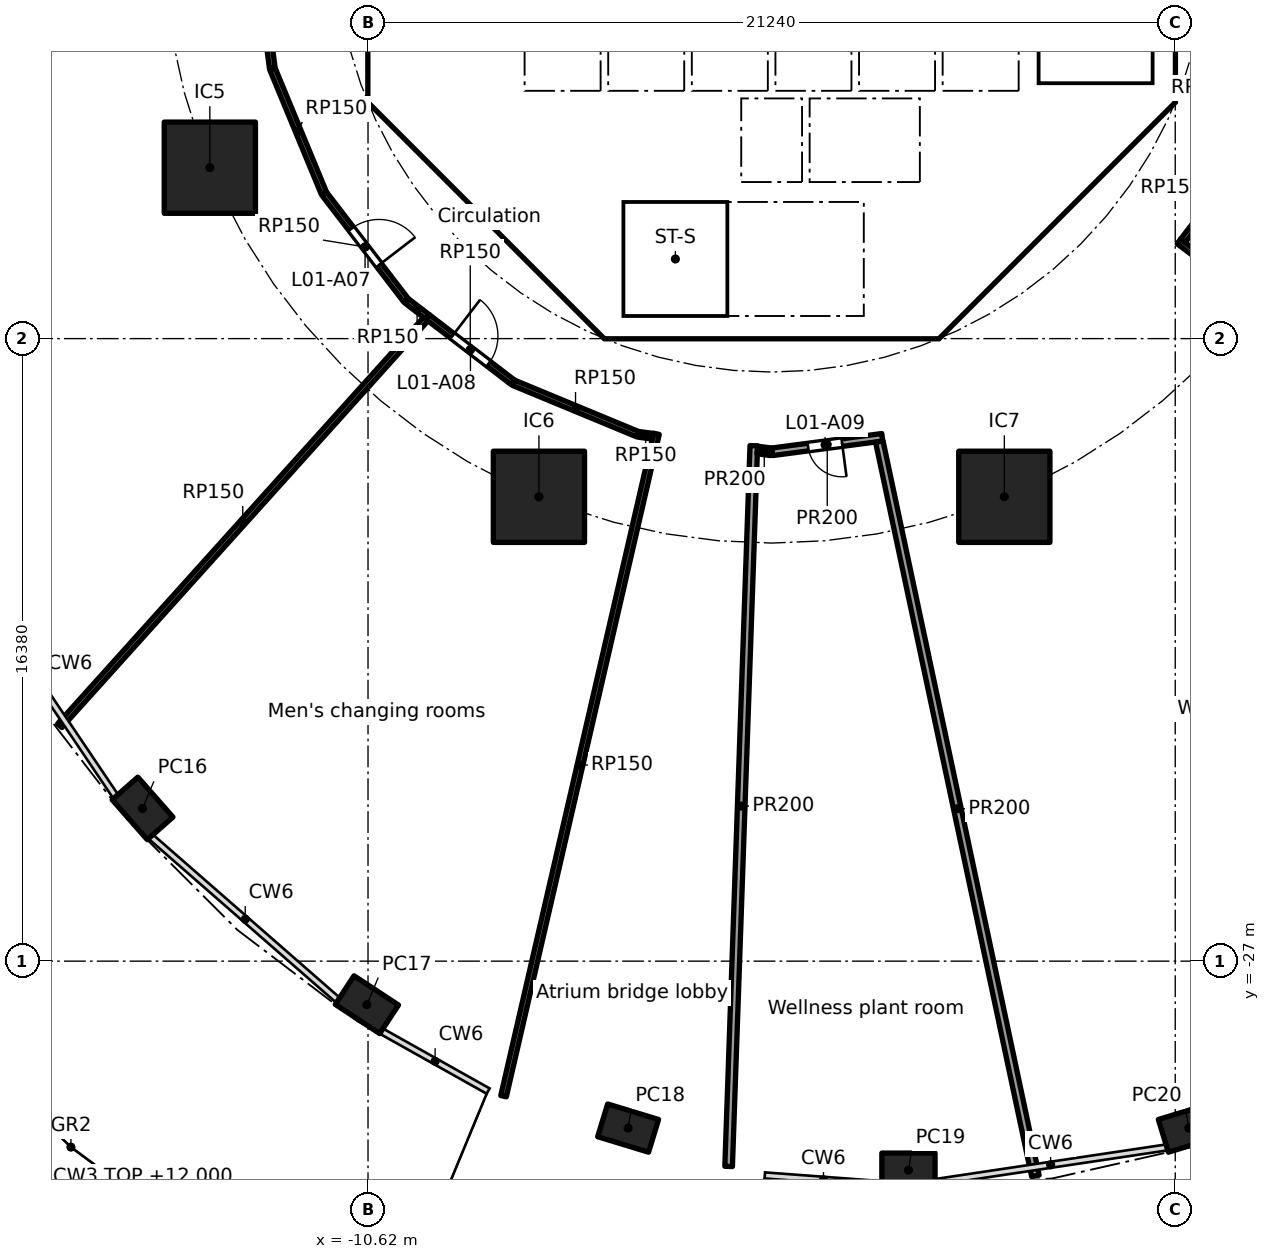
"""IFC4 building model, lengths in metres.
Left out: names, types, materials, properties, quantities, classifications, styles, units other than length and angle.
Written with IfcOpenShell. Run it as: python <this file> out.ifc"""

import sys

from ifc_helpers import new_model, si_unit, direction, frame, frame_2d, origin, origin_2d, place, context, subcontext, project, spatial, polyline, rectangle, hollow_rectangle, outline, extrude, element, fill, save


model = new_model("IFC4")
c1 = context("Model", 3, precision=1e-05, world=origin(), true_north=direction((0.0, 1.0)))
c2 = subcontext(c1, "Body", "Model", "MODEL_VIEW")
j1 = project(units=[si_unit("LENGTHUNIT", "METRE"), si_unit("PLANEANGLEUNIT", "RADIAN")], contexts=[c1])
p1 = place(None, origin())
s1 = spatial("IfcSite", under=j1, at=p1, CompositionType="ELEMENT")
p2 = place(p1, origin())
s2 = spatial("IfcBuilding", under=s1, at=p2, CompositionType="ELEMENT")
p3 = place(p2, frame((0.0, 0.0, 7.0)))
s3 = spatial("IfcBuildingStorey", under=s2, at=p3, CompositionType="ELEMENT", Elevation=7.0)
for number, where, z_axis, x_axis in (
    (1, (-16.552, -22.981, 0.0), (0.0, 0.0, 1.0), (0.66, -0.751, 0.0)),
    (2, (-10.65, -28.146, 0.0), (0.0, 0.0, 1.0), (0.836, -0.549, 0.0)),
    (3, (-3.776, -31.393, 0.0), (0.0, 0.0, 1.0), (0.957, -0.292, 0.0)),
    (4, (3.6, -32.5, 0.0), (0.0, 0.0, 1.0), (1.0, 0.0, 0.0)),
    (5, (10.976, -31.393, 0.0), (0.0, 0.0, 1.0), (0.957, 0.292, 0.0)),
):
    element("IfcColumn", number, at=place(p3, frame(where, z_axis=z_axis, x_axis=x_axis)), inside=s3, PredefinedType="COLUMN", context=c2, shape_type="SweptSolid", body=[
        extrude(hollow_rectangle(XDim=1.4, YDim=0.9, WallThickness=0.05, at=origin_2d()), origin(), (0.0, 0.0, 1.0), 5.0),
    ])
for number, where, z_axis, x_axis in (
    (6, (-14.782, -6.123, 0.0), (0.0, 0.0, 1.0), (1.0, 0.0, 0.0)),
    (7, (-6.123, -14.782, 0.0), (0.0, 0.0, 1.0), (1.0, 0.0, 0.0)),
    (8, (6.123, -14.782, 0.0), (0.0, 0.0, 1.0), (1.0, 0.0, 0.0)),
):
    element("IfcColumn", number, at=place(p3, frame(where, z_axis=z_axis, x_axis=x_axis)), inside=s3, PredefinedType="COLUMN", context=c2, shape_type="SweptSolid", body=[
        extrude(rectangle(XDim=2.4, YDim=2.4, at=origin_2d()), origin(), (0.0, 0.0, 1.0), 5.0),
    ])
p4 = place(p3, frame((-10.325, 3.801, 0.0), z_axis=(0.0, 0.0, 1.0), x_axis=(0.0, -1.0, 0.0)))
e9 = element("IfcWall", 9, at=p4, inside=s3, PredefinedType="SHEAR", context=c2, shape_type="SweptSolid", body=[
    extrude(rectangle(XDim=7.602, YDim=0.6, at=frame_2d((3.801, 0.0))), origin(), (0.0, 0.0, 1.0), 4.7),
])
p5 = place(p4, frame((0.651, 0.0, 0.0)))
e10 = element("IfcOpeningElement", 10, at=p5, cuts=e9, PredefinedType="OPENING", context=c2, shape_type="SweptSolid", body=[
    extrude(rectangle(XDim=1.5, YDim=2.1, at=frame_2d((0.75, 1.05))), frame((0.0, 0.31, 0.0), z_axis=(0.0, -1.0, 0.0), x_axis=(1.0, 0.0, 0.0)), (0.0, 0.0, 1.0), 0.62),
])
p6 = place(p4, frame((5.451, 0.0, 0.0)))
e11 = element("IfcOpeningElement", 11, at=p6, cuts=e9, PredefinedType="OPENING", context=c2, shape_type="SweptSolid", body=[
    extrude(rectangle(XDim=1.5, YDim=2.1, at=frame_2d((0.75, 1.05))), frame((0.0, 0.31, 0.0), z_axis=(0.0, -1.0, 0.0), x_axis=(1.0, 0.0, 0.0)), (0.0, 0.0, 1.0), 0.62),
])
p7 = place(p3, frame((-9.988, -4.613, 0.0), z_axis=(0.0, 0.0, 1.0), x_axis=(0.707106781187, -0.707106781187, 0.0)))
e12 = element("IfcWall", 12, at=p7, inside=s3, PredefinedType="SHEAR", context=c2, shape_type="SweptSolid", body=[
    extrude(rectangle(XDim=7.602, YDim=0.6, at=frame_2d((3.801, 0.0))), origin(), (0.0, 0.0, 1.0), 4.7),
])
p8 = place(p7, frame((6.151, 0.0, 0.0)))
e13 = element("IfcOpeningElement", 13, at=p8, cuts=e12, PredefinedType="OPENING", context=c2, shape_type="SweptSolid", body=[
    extrude(rectangle(XDim=1.1, YDim=2.1, at=frame_2d((0.55, 1.05))), frame((0.0, 0.31, 0.0), z_axis=(0.0, -1.0, 0.0), x_axis=(1.0, 0.0, 0.0)), (0.0, 0.0, 1.0), 0.62),
])
p9 = place(p3, frame((4.613, -9.988, 0.0), z_axis=(0.0, 0.0, 1.0), x_axis=(0.707106781187, 0.707106781187, 0.0)))
e14 = element("IfcWall", 14, at=p9, inside=s3, PredefinedType="SHEAR", context=c2, shape_type="SweptSolid", body=[
    extrude(rectangle(XDim=7.602, YDim=0.6, at=frame_2d((3.801, 0.0))), origin(), (0.0, 0.0, 1.0), 4.7),
])
p10 = place(p9, frame((3.201, 0.0, 0.0)))
e15 = element("IfcOpeningElement", 15, at=p10, cuts=e14, PredefinedType="OPENING", context=c2, shape_type="SweptSolid", body=[
    extrude(rectangle(XDim=1.2, YDim=2.1, at=frame_2d((0.6, 1.05))), frame((0.0, 0.31, 0.0), z_axis=(0.0, -1.0, 0.0), x_axis=(1.0, 0.0, 0.0)), (0.0, 0.0, 1.0), 0.62),
])
p11 = place(p3, frame((4.0, -10.025, 0.0), z_axis=(0.0, 0.0, 1.0), x_axis=(0.0, 1.0, 0.0)))
e16 = element("IfcWall", 16, at=p11, inside=s3, PredefinedType="SOLIDWALL", context=c2, shape_type="SweptSolid", body=[
    extrude(rectangle(XDim=3.0, YDim=0.2, at=frame_2d((1.5, 0.0))), origin(), (0.0, 0.0, 1.0), 4.7),
])
p12 = place(p11, frame((0.975, 0.0, 0.0)))
e17 = element("IfcOpeningElement", 17, at=p12, cuts=e16, PredefinedType="OPENING", context=c2, shape_type="SweptSolid", body=[
    extrude(rectangle(XDim=1.1, YDim=2.1, at=frame_2d((0.55, 1.05))), frame((0.0, 0.11, 0.0), z_axis=(0.0, -1.0, 0.0), x_axis=(1.0, 0.0, 0.0)), (0.0, 0.0, 1.0), 0.22),
])
p13 = place(p3, frame((-5.8, -8.227, 0.0), z_axis=(0.0, 0.0, 1.0), x_axis=(0.0, 1.0, 0.0)))
e18 = element("IfcWall", 18, at=p13, inside=s3, PredefinedType="PARTITIONING", context=c2, shape_type="SweptSolid", body=[
    extrude(rectangle(XDim=3.927, YDim=0.15, at=frame_2d((1.963, 0.0))), origin(), (0.0, 0.0, 1.0), 4.7),
])
p14 = place(p13, frame((1.476, 0.0, 0.0)))
e19 = element("IfcOpeningElement", 19, at=p14, cuts=e18, PredefinedType="OPENING", context=c2, shape_type="SweptSolid", body=[
    extrude(rectangle(XDim=0.9, YDim=2.1, at=frame_2d((0.45, 1.05))), frame((0.0, 0.085, 0.0), z_axis=(0.0, -1.0, 0.0), x_axis=(1.0, 0.0, 0.0)), (0.0, 0.0, 1.0), 0.17),
])
p15 = place(p3, frame((4.0, -6.5, 0.0), z_axis=(0.0, 0.0, 1.0), x_axis=(0.0, 1.0, 0.0)))
e20 = element("IfcWall", 20, at=p15, inside=s3, PredefinedType="SOLIDWALL", context=c2, shape_type="SweptSolid", body=[
    extrude(rectangle(XDim=2.2, YDim=0.2, at=frame_2d((1.1, 0.0))), origin(), (0.0, 0.0, 1.0), 4.7),
])
p16 = place(p15, frame((0.55, 0.0, 0.0)))
e21 = element("IfcOpeningElement", 21, at=p16, cuts=e20, PredefinedType="OPENING", context=c2, shape_type="SweptSolid", body=[
    extrude(rectangle(XDim=1.1, YDim=2.1, at=frame_2d((0.55, 1.05))), frame((0.0, 0.11, 0.0), z_axis=(0.0, -1.0, 0.0), x_axis=(1.0, 0.0, 0.0)), (0.0, 0.0, 1.0), 0.22),
])
p17 = place(p3, frame((-4.0, -6.5, 0.0), z_axis=(0.0, 0.0, 1.0), x_axis=(0.0, 1.0, 0.0)))
e22 = element("IfcWall", 22, at=p17, inside=s3, PredefinedType="SOLIDWALL", context=c2, shape_type="SweptSolid", body=[
    extrude(rectangle(XDim=2.2, YDim=0.2, at=frame_2d((1.1, 0.0))), origin(), (0.0, 0.0, 1.0), 4.7),
])
p18 = place(p17, frame((0.65, 0.0, 0.0)))
e23 = element("IfcOpeningElement", 23, at=p18, cuts=e22, PredefinedType="OPENING", context=c2, shape_type="SweptSolid", body=[
    extrude(rectangle(XDim=0.9, YDim=2.1, at=frame_2d((0.45, 1.05))), frame((0.0, 0.11, 0.0), z_axis=(0.0, -1.0, 0.0), x_axis=(1.0, 0.0, 0.0)), (0.0, 0.0, 1.0), 0.22),
])
p19 = place(p3, origin())
e24 = element("IfcWall", 24, at=p19, inside=s3, PredefinedType="SHEAR", context=c2, shape_type="SweptSolid", body=[
    extrude(outline(polyline([(-10.625, -3.801), (-10.025, -3.801), (-10.025, -4.152), (-9.776, -4.401), (-10.2, -4.825), (-10.625, -4.401), (-10.625, -3.801)])), origin(), (0.0, 0.0, 1.0), 4.7),
])
p20 = place(p3, origin())
e25 = element("IfcWall", 25, at=p20, inside=s3, PredefinedType="SHEAR", context=c2, shape_type="SweptSolid", body=[
    extrude(outline(polyline([(-4.152, -10.025), (4.152, -10.025), (4.401, -9.776), (4.825, -10.2), (4.401, -10.625), (-4.401, -10.625), (-4.825, -10.2), (-4.401, -9.776), (-4.152, -10.025)])), origin(), (0.0, 0.0, 1.0), 4.7),
])
p21 = place(p3, origin())
e26 = element("IfcWall", 26, at=p21, inside=s3, PredefinedType="SHEAR", context=c2, shape_type="SweptSolid", body=[
    extrude(outline(polyline([(9.776, -4.401), (10.025, -4.152), (10.025, -3.801), (10.025, 4.152), (9.776, 4.401), (10.2, 4.825), (10.625, 4.401), (10.625, -4.401), (10.2, -4.825), (9.776, -4.401)])), origin(), (0.0, 0.0, 1.0), 4.7),
])
for number, where, z_axis, x_axis in (
    (27, (-0.9, -6.5, 0.0), (0.0, 0.0, 1.0), (0.0, 1.0, 0.0)),
    (28, (0.9, -6.5, 0.0), (0.0, 0.0, 1.0), (0.0, 1.0, 0.0)),
):
    element("IfcWall", number, at=place(p3, frame(where, z_axis=z_axis, x_axis=x_axis)), inside=s3, PredefinedType="SOLIDWALL", context=c2, shape_type="SweptSolid", body=[
        extrude(rectangle(XDim=2.2, YDim=0.2, at=frame_2d((1.1, 0.0))), origin(), (0.0, 0.0, 1.0), 4.7),
    ])
p22 = place(p3, origin())
e29 = element("IfcWall", 29, at=p22, inside=s3, PredefinedType="SOLIDWALL", context=c2, shape_type="SweptSolid", body=[
    extrude(outline(polyline([(-6.7, -2.1), (-6.5, -2.1), (-6.5, -4.1), (-4.5, -4.1), (-4.5, -2.1), (-4.3, -2.1), (-4.3, -4.1), (-2.3, -4.1), (-2.3, -2.1), (-2.1, -2.1), (-2.1, -4.1), (-0.1, -4.1), (-0.1, -2.1), (0.1, -2.1), (0.1, -4.1), (2.1, -4.1), (2.1, -2.1), (2.3, -2.1), (2.3, -4.1), (4.3, -4.1), (4.3, -2.1), (4.5, -2.1), (4.5, -4.1), (6.5, -4.1), (6.5, -2.1), (6.7, -2.1), (6.7, -4.3), (-6.7, -4.3), (-6.7, -2.1)])), origin(), (0.0, 0.0, 1.0), 4.7),
])
p23 = place(p3, frame((-10.025, -4.0, 0.0), z_axis=(0.0, 0.0, 1.0), x_axis=(1.0, 0.0, 0.0)))
e30 = element("IfcWall", 30, at=p23, inside=s3, PredefinedType="PARTITIONING", context=c2, shape_type="SweptSolid", body=[
    extrude(rectangle(XDim=3.325, YDim=0.2, at=frame_2d((1.662, 0.0))), origin(), (0.0, 0.0, 1.0), 4.7),
])
p24 = place(p3, origin())
e31 = element("IfcWall", 31, at=p24, inside=s3, PredefinedType="SOLIDWALL", context=c2, shape_type="SweptSolid", body=[
    extrude(outline(polyline([(-3.9, -10.025), (-4.1, -10.025), (-4.1, -7.025), (-3.9, -7.025), (-3.9, -10.025)])), origin(), (0.0, 0.0, 1.0), 4.7),
])
p25 = place(p3, origin())
e32 = element("IfcWall", 32, at=p25, inside=s3, PredefinedType="SOLIDWALL", context=c2, shape_type="SweptSolid", body=[
    extrude(outline(polyline([(4.1, -7.025), (-4.1, -7.025), (-4.1, -6.5), (4.1, -6.5), (4.1, -7.025)])), origin(), (0.0, 0.0, 1.0), 4.7),
])
p26 = place(p3, origin())
e33 = element("IfcWall", 33, at=p26, inside=s3, PredefinedType="SOLIDWALL", context=c2, shape_type="SweptSolid", body=[
    extrude(outline(polyline([(7.025, -3.9), (6.7, -3.9), (6.7, 3.9), (7.025, 3.9), (7.025, -3.9)])), origin(), (0.0, 0.0, 1.0), 4.7),
])
p27 = place(p3, origin())
e34 = element("IfcWall", 34, at=p27, inside=s3, PredefinedType="SOLIDWALL", context=c2, shape_type="SweptSolid", body=[
    extrude(outline(polyline([(10.025, -4.1), (6.7, -4.1), (6.7, -3.9), (10.025, -3.9), (10.025, -4.1)])), origin(), (0.0, 0.0, 1.0), 4.7),
])
p28 = place(p3, frame((-13.138, -3.508, 0.0), z_axis=(0.0, 0.0, 1.0), x_axis=(-0.130499283623, 0.991448403586, 0.0)))
e35 = element("IfcWall", 35, at=p28, inside=s3, PredefinedType="PARTITIONING", context=c2, shape_type="SweptSolid", body=[
    extrude(rectangle(XDim=3.527, YDim=0.15, at=frame_2d((1.763, 0.0))), origin(), (0.0, 0.0, 1.0), 4.7),
])
p29 = place(p3, frame((-11.782, -6.789, 0.0), z_axis=(0.0, 0.0, 1.0), x_axis=(-0.382677866108, 0.923881838111, 0.0)))
e36 = element("IfcWall", 36, at=p29, inside=s3, PredefinedType="PARTITIONING", context=c2, shape_type="SweptSolid", body=[
    extrude(rectangle(XDim=3.527, YDim=0.15, at=frame_2d((1.763, 0.0))), origin(), (0.0, 0.0, 1.0), 4.7),
])
p30 = place(p3, frame((-9.624, -9.607, 0.0), z_axis=(0.0, 0.0, 1.0), x_axis=(-0.608736710054, 0.793372307201, 0.0)))
e37 = element("IfcWall", 37, at=p30, inside=s3, PredefinedType="PARTITIONING", context=c2, shape_type="SweptSolid", body=[
    extrude(rectangle(XDim=3.527, YDim=0.15, at=frame_2d((1.763, 0.0))), origin(), (0.0, 0.0, 1.0), 4.7),
])
p31 = place(p30, frame((1.163, 0.0, 0.0)))
e38 = element("IfcOpeningElement", 38, at=p31, cuts=e37, PredefinedType="OPENING", context=c2, shape_type="SweptSolid", body=[
    extrude(rectangle(XDim=1.2, YDim=2.1, at=frame_2d((0.6, 1.05))), frame((0.0, 0.085, 0.0), z_axis=(0.0, -1.0, 0.0), x_axis=(1.0, 0.0, 0.0)), (0.0, 0.0, 1.0), 0.17),
])
p32 = place(p3, frame((-9.101, -10.107, 0.0), z_axis=(0.0, 0.0, 1.0), x_axis=(-0.669132472721, -0.743143144994, 0.0)))
e39 = element("IfcWall", 39, at=p32, inside=s3, PredefinedType="PARTITIONING", context=c2, shape_type="SweptSolid", body=[
    extrude(rectangle(XDim=14.392, YDim=0.15, at=frame_2d((7.196, 0.0))), origin(), (0.0, 0.0, 1.0), 4.7),
])
p33 = place(p3, frame((-9.05, -10.051, 0.0), z_axis=(0.0, 0.0, 1.0), x_axis=(-0.793399175387, 0.608701690893, 0.0)))
e40 = element("IfcWall", 40, at=p33, inside=s3, PredefinedType="PARTITIONING", context=c2, shape_type="SweptSolid", body=[
    extrude(rectangle(XDim=0.702, YDim=0.15, at=frame_2d((0.351, 0.0))), origin(), (0.0, 0.0, 1.0), 4.7),
])
p34 = place(p3, frame((-7.053, -30.552, 0.0), z_axis=(0.0, 0.0, 1.0), x_axis=(0.224943248141, 0.974371866956, 0.0)))
e41 = element("IfcWall", 41, at=p34, inside=s3, PredefinedType="PARTITIONING", context=c2, shape_type="SweptSolid", body=[
    extrude(rectangle(XDim=17.885, YDim=0.15, at=frame_2d((8.943, 0.0))), origin(), (0.0, 0.0, 1.0), 4.7),
])
p35 = place(p3, frame((-6.809, -11.771, 0.0), z_axis=(0.0, 0.0, 1.0), x_axis=(-0.793365630445, 0.608745411834, 0.0)))
e42 = element("IfcWall", 42, at=p35, inside=s3, PredefinedType="PARTITIONING", context=c2, shape_type="SweptSolid", body=[
    extrude(rectangle(XDim=2.825, YDim=0.15, at=frame_2d((1.412, 0.0))), origin(), (0.0, 0.0, 1.0), 4.7),
])
p36 = place(p35, frame((0.806, 0.0, 0.0)))
e43 = element("IfcOpeningElement", 43, at=p36, cuts=e42, PredefinedType="OPENING", context=c2, shape_type="SweptSolid", body=[
    extrude(rectangle(XDim=1.2, YDim=2.1, at=frame_2d((0.6, 1.05))), frame((0.0, 0.085, 0.0), z_axis=(0.0, -1.0, 0.0), x_axis=(1.0, 0.0, 0.0)), (0.0, 0.0, 1.0), 0.17),
])
p37 = place(p3, frame((-3.531, -13.132, 0.0), z_axis=(0.0, 0.0, 1.0), x_axis=(-0.923881838111, 0.382677866108, 0.0)))
e44 = element("IfcWall", 44, at=p37, inside=s3, PredefinedType="PARTITIONING", context=c2, shape_type="SweptSolid", body=[
    extrude(rectangle(XDim=3.527, YDim=0.15, at=frame_2d((1.763, 0.0))), origin(), (0.0, 0.0, 1.0), 4.7),
])
p38 = place(p3, frame((-3.122, -13.189, 0.0), z_axis=(0.0, 0.0, 1.0), x_axis=(-0.991467089631, 0.130357240609, 0.0)))
e45 = element("IfcWall", 45, at=p38, inside=s3, PredefinedType="PARTITIONING", context=c2, shape_type="SweptSolid", body=[
    extrude(rectangle(XDim=0.39, YDim=0.15, at=frame_2d((0.195, 0.0))), origin(), (0.0, 0.0, 1.0), 4.7),
])
p39 = place(p3, frame((10.714, -8.064, 0.0), z_axis=(0.0, 0.0, 1.0), x_axis=(0.798982081461, -0.601354831612, 0.0)))
e46 = element("IfcWall", 46, at=p39, inside=s3, PredefinedType="PARTITIONING", context=c2, shape_type="SweptSolid", body=[
    extrude(rectangle(XDim=19.824, YDim=0.15, at=frame_2d((9.912, 0.0))), origin(), (0.0, 0.0, 1.0), 4.7),
])
p40 = place(p3, frame((11.771, -6.809, 0.0), z_axis=(0.0, 0.0, 1.0), x_axis=(-0.608736478404, -0.79337248494, 0.0)))
e47 = element("IfcWall", 47, at=p40, inside=s3, PredefinedType="PARTITIONING", context=c2, shape_type="SweptSolid", body=[
    extrude(rectangle(XDim=1.563, YDim=0.15, at=frame_2d((0.781, 0.0))), origin(), (0.0, 0.0, 1.0), 4.7),
])
p41 = place(p3, frame((-0.469, -13.438, 0.0), z_axis=(0.0, 0.0, 1.0), x_axis=(-0.034906746489, -0.999390573825, 0.0)))
e48 = element("IfcWall", 48, at=p41, inside=s3, PredefinedType="PARTITIONING", context=c2, shape_type="SweptSolid", body=[
    extrude(rectangle(XDim=18.975, YDim=0.2, at=frame_2d((9.487, 0.0))), origin(), (0.0, 0.0, 1.0), 4.7),
])
p42 = place(p3, frame((-0.015, -13.598, 0.0), z_axis=(0.0, 0.0, 1.0), x_axis=(-0.991532387941, 0.129859630617, 0.0)))
e49 = element("IfcWall", 49, at=p42, inside=s3, PredefinedType="PARTITIONING", context=c2, shape_type="SweptSolid", body=[
    extrude(rectangle(XDim=0.361, YDim=0.2, at=frame_2d((0.181, 0.0))), origin(), (0.0, 0.0, 1.0), 4.7),
])
p43 = place(p3, frame((2.912, -13.217, 0.0), z_axis=(0.0, 0.0, 1.0), x_axis=(-0.991454864412, -0.130450189089, 0.0)))
e50 = element("IfcWall", 50, at=p43, inside=s3, PredefinedType="PARTITIONING", context=c2, shape_type="SweptSolid", body=[
    extrude(rectangle(XDim=2.921, YDim=0.2, at=frame_2d((1.461, 0.0))), origin(), (0.0, 0.0, 1.0), 4.7),
])
p44 = place(p43, frame((1.069, 0.0, 0.0)))
e51 = element("IfcOpeningElement", 51, at=p44, cuts=e50, PredefinedType="OPENING", context=c2, shape_type="SweptSolid", body=[
    extrude(rectangle(XDim=0.9, YDim=2.1, at=frame_2d((0.45, 1.05))), frame((0.0, 0.11, 0.0), z_axis=(0.0, -1.0, 0.0), x_axis=(1.0, 0.0, 0.0)), (0.0, 0.0, 1.0), 0.22),
])
p45 = place(p3, frame((6.94, -32.651, 0.0), z_axis=(0.0, 0.0, 1.0), x_axis=(-0.207911671545, 0.97814760483, 0.0)))
e52 = element("IfcWall", 52, at=p45, inside=s3, PredefinedType="PARTITIONING", context=c2, shape_type="SweptSolid", body=[
    extrude(rectangle(XDim=19.754, YDim=0.2, at=frame_2d((9.877, 0.0))), origin(), (0.0, 0.0, 1.0), 4.7),
])
p46 = place(p16, origin())
e53 = element("IfcDoor", 53, at=p46, inside=s3, OperationType="DOUBLE_DOOR_SLIDING", PredefinedType="DOOR", context=c2, shape_type="SweptSolid", body=[
    extrude(rectangle(XDim=1.1, YDim=2.1, at=frame_2d((0.55, 1.05))), frame((0.0, 0.025, 0.0), z_axis=(0.0, -1.0, 0.0), x_axis=(1.0, 0.0, 0.0)), (0.0, 0.0, 1.0), 0.05),
])
fill(e21, e53)
p47 = place(p12, origin())
e54 = element("IfcDoor", 54, at=p47, inside=s3, OperationType="SINGLE_SWING_LEFT", PredefinedType="DOOR", context=c2, shape_type="SweptSolid", body=[
    extrude(rectangle(XDim=1.1, YDim=2.1, at=frame_2d((0.55, 1.05))), frame((0.0, 0.025, 0.0), z_axis=(0.0, -1.0, 0.0), x_axis=(1.0, 0.0, 0.0)), (0.0, 0.0, 1.0), 0.05),
])
fill(e17, e54)
p48 = place(p14, origin())
e55 = element("IfcDoor", 55, at=p48, inside=s3, OperationType="SINGLE_SWING_LEFT", PredefinedType="DOOR", context=c2, shape_type="SweptSolid", body=[
    extrude(rectangle(XDim=0.9, YDim=2.1, at=frame_2d((0.45, 1.05))), frame((0.0, 0.025, 0.0), z_axis=(0.0, -1.0, 0.0), x_axis=(1.0, 0.0, 0.0)), (0.0, 0.0, 1.0), 0.05),
])
fill(e19, e55)
p49 = place(p18, frame((0.9, 0.0, 0.0), x_axis=(-1.0, 0.0, 0.0)))
e56 = element("IfcDoor", 56, at=p49, inside=s3, OperationType="SINGLE_SWING_LEFT", PredefinedType="DOOR", context=c2, shape_type="SweptSolid", body=[
    extrude(rectangle(XDim=0.9, YDim=2.1, at=frame_2d((0.45, 1.05))), frame((0.0, 0.025, 0.0), z_axis=(0.0, -1.0, 0.0), x_axis=(1.0, 0.0, 0.0)), (0.0, 0.0, 1.0), 0.05),
])
fill(e23, e56)
p50 = place(p10, origin())
e57 = element("IfcDoor", 57, at=p50, inside=s3, OperationType="SINGLE_SWING_LEFT", PredefinedType="DOOR", context=c2, shape_type="SweptSolid", body=[
    extrude(rectangle(XDim=1.2, YDim=2.1, at=frame_2d((0.6, 1.05))), frame((0.0, 0.025, 0.0), z_axis=(0.0, -1.0, 0.0), x_axis=(1.0, 0.0, 0.0)), (0.0, 0.0, 1.0), 0.05),
])
fill(e15, e57)
p51 = place(p6, origin())
e58 = element("IfcDoor", 58, at=p51, inside=s3, OperationType="DOUBLE_DOOR_SINGLE_SWING", PredefinedType="DOOR", context=c2, shape_type="SweptSolid", body=[
    extrude(rectangle(XDim=1.5, YDim=2.1, at=frame_2d((0.75, 1.05))), frame((0.0, 0.025, 0.0), z_axis=(0.0, -1.0, 0.0), x_axis=(1.0, 0.0, 0.0)), (0.0, 0.0, 1.0), 0.05),
])
fill(e11, e58)
p52 = place(p8, origin())
e59 = element("IfcDoor", 59, at=p52, inside=s3, OperationType="SINGLE_SWING_LEFT", PredefinedType="DOOR", context=c2, shape_type="SweptSolid", body=[
    extrude(rectangle(XDim=1.1, YDim=2.1, at=frame_2d((0.55, 1.05))), frame((0.0, 0.025, 0.0), z_axis=(0.0, -1.0, 0.0), x_axis=(1.0, 0.0, 0.0)), (0.0, 0.0, 1.0), 0.05),
])
fill(e13, e59)
p53 = place(p31, frame((1.2, 0.0, 0.0), x_axis=(-1.0, 0.0, 0.0)))
e60 = element("IfcDoor", 60, at=p53, inside=s3, OperationType="SINGLE_SWING_RIGHT", PredefinedType="DOOR", context=c2, shape_type="SweptSolid", body=[
    extrude(rectangle(XDim=1.2, YDim=2.1, at=frame_2d((0.6, 1.05))), frame((0.0, 0.025, 0.0), z_axis=(0.0, -1.0, 0.0), x_axis=(1.0, 0.0, 0.0)), (0.0, 0.0, 1.0), 0.05),
])
fill(e38, e60)
p54 = place(p36, frame((1.2, 0.0, 0.0), x_axis=(-1.0, 0.0, 0.0)))
e61 = element("IfcDoor", 61, at=p54, inside=s3, OperationType="SINGLE_SWING_LEFT", PredefinedType="DOOR", context=c2, shape_type="SweptSolid", body=[
    extrude(rectangle(XDim=1.2, YDim=2.1, at=frame_2d((0.6, 1.05))), frame((0.0, 0.025, 0.0), z_axis=(0.0, -1.0, 0.0), x_axis=(1.0, 0.0, 0.0)), (0.0, 0.0, 1.0), 0.05),
])
fill(e43, e61)
p55 = place(p44, origin())
e62 = element("IfcDoor", 62, at=p55, inside=s3, OperationType="SINGLE_SWING_LEFT", PredefinedType="DOOR", context=c2, shape_type="SweptSolid", body=[
    extrude(rectangle(XDim=0.9, YDim=2.1, at=frame_2d((0.45, 1.05))), frame((0.0, 0.025, 0.0), z_axis=(0.0, -1.0, 0.0), x_axis=(1.0, 0.0, 0.0)), (0.0, 0.0, 1.0), 0.05),
])
fill(e51, e62)
save(model, sys.argv[1])
